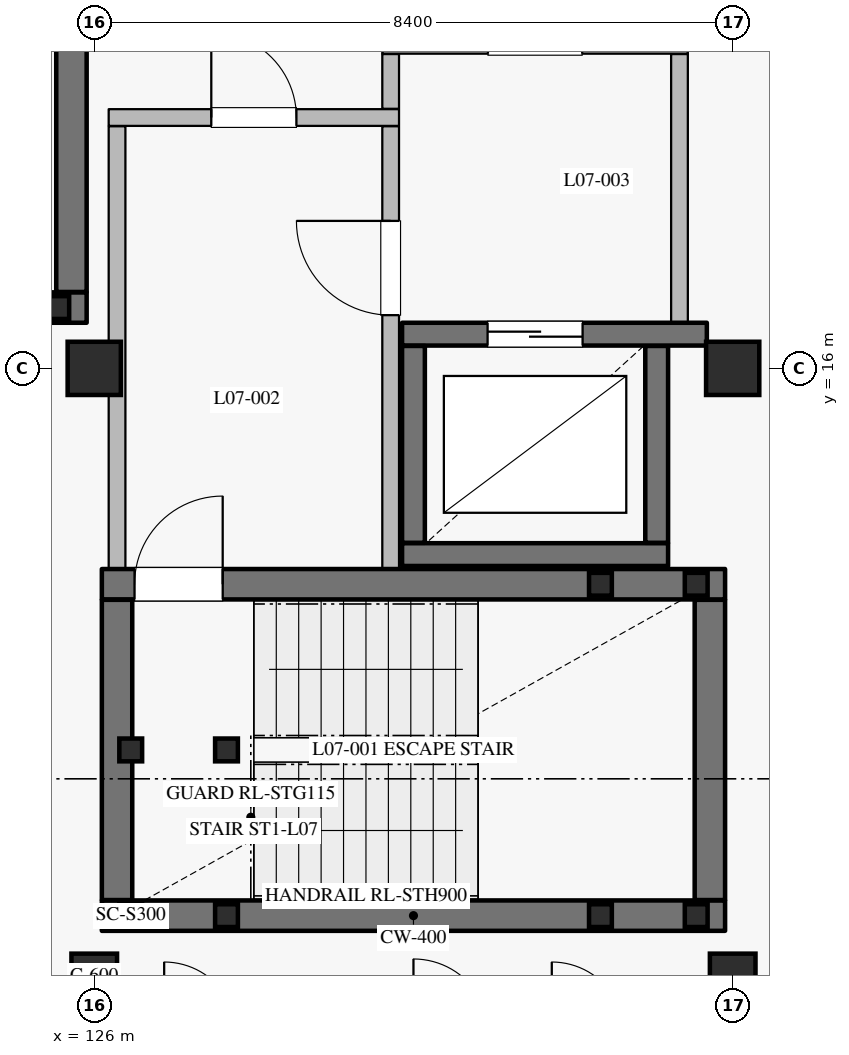
"""IFC4 building model, lengths in metres.
Left out: names, types, materials, properties, quantities, classifications, styles, units other than length and angle.
Written with IfcOpenShell. Run it as: python <this file> out.ifc"""

import sys

from ifc_helpers import new_model, si_unit, direction, frame, frame_2d, origin, origin_2d, place, context, subcontext, project, spatial, rectangle, hollow_rectangle, extrude, element, fill, save


model = new_model("IFC4")
c1 = context("Model", 3, precision=1e-05, world=origin(), true_north=direction((0.0, 1.0)))
c2 = subcontext(c1, "Body", "Model", "MODEL_VIEW")
j1 = project(units=[si_unit("LENGTHUNIT", "METRE"), si_unit("PLANEANGLEUNIT", "RADIAN")], contexts=[c1])
p1 = place(None, origin())
s1 = spatial("IfcSite", under=j1, at=p1, CompositionType="ELEMENT")
p2 = place(p1, origin())
s2 = spatial("IfcBuilding", under=s1, at=p2, CompositionType="ELEMENT")
p3 = place(p2, frame((0.0, 0.0, 32.4)))
s3 = spatial("IfcBuildingStorey", under=s2, at=p3, CompositionType="ELEMENT", Elevation=32.4)
for number, where, z_axis, x_axis in (
    (1, (126.0, 16.0, 0.0), (0.0, 0.0, 1.0), (1.0, 0.0, 0.0)),
    (2, (134.4, 16.0, 0.0), (0.0, 0.0, 1.0), (1.0, 0.0, 0.0)),
):
    element("IfcColumn", number, at=place(p3, frame(where, z_axis=z_axis, x_axis=x_axis)), inside=s3, PredefinedType="COLUMN", context=c2, shape_type="SweptSolid", body=[
        extrude(rectangle(XDim=0.7, YDim=0.7, at=origin_2d()), origin(), (0.0, 0.0, 1.0), 3.6),
    ])
for number, where, z_axis, x_axis in (
    (3, (126.0, 8.0, 0.0), (0.0, 0.0, 1.0), (1.0, 0.0, 0.0)),
    (4, (134.4, 8.0, 0.0), (0.0, 0.0, 1.0), (1.0, 0.0, 0.0)),
):
    element("IfcColumn", number, at=place(p3, frame(where, z_axis=z_axis, x_axis=x_axis)), inside=s3, PredefinedType="COLUMN", context=c2, shape_type="SweptSolid", body=[
        extrude(rectangle(XDim=0.6, YDim=0.6, at=origin_2d()), origin(), (0.0, 0.0, 1.0), 3.6),
    ])
p4 = place(p3, frame((130.05, 13.55, 0.0), z_axis=(0.0, 0.0, 1.0), x_axis=(1.0, 0.0, 0.0)))
e5 = element("IfcWall", 5, at=p4, inside=s3, PredefinedType="SHEAR", context=c2, shape_type="SweptSolid", body=[
    extrude(rectangle(XDim=3.5, YDim=0.3, at=frame_2d((1.75, 0.0))), origin(), (0.0, 0.0, 1.0), 3.335),
])
p5 = place(p3, frame((133.4, 13.705, 0.0), z_axis=(0.0, 0.0, 1.0), x_axis=(0.0, 1.0, 0.0)))
e6 = element("IfcWall", 6, at=p5, inside=s3, PredefinedType="SHEAR", context=c2, shape_type="SweptSolid", body=[
    extrude(rectangle(XDim=2.59, YDim=0.3, at=frame_2d((1.295, 0.0))), origin(), (0.0, 0.0, 1.0), 3.335),
])
p6 = place(p3, frame((134.06, 16.45, 0.0), z_axis=(0.0, 0.0, 1.0), x_axis=(-1.0, 0.0, 0.0)))
e7 = element("IfcWall", 7, at=p6, inside=s3, PredefinedType="SHEAR", context=c2, shape_type="SweptSolid", body=[
    extrude(rectangle(XDim=4.01, YDim=0.3, at=frame_2d((2.005, 0.0))), origin(), (0.0, 0.0, 1.0), 3.335),
])
p7 = place(p6, frame((1.635, 0.0, 0.0)))
e8 = element("IfcOpeningElement", 8, at=p7, cuts=e7, PredefinedType="OPENING", context=c2, shape_type="SweptSolid", body=[
    extrude(rectangle(XDim=1.25, YDim=2.25, at=frame_2d((0.625, 1.125))), frame((0.0, 0.16, 0.0), z_axis=(0.0, -1.0, 0.0), x_axis=(1.0, 0.0, 0.0)), (0.0, 0.0, 1.0), 0.32),
])
p8 = place(p3, frame((130.2, 16.295, 0.0), z_axis=(0.0, 0.0, 1.0), x_axis=(0.0, -1.0, 0.0)))
e9 = element("IfcWall", 9, at=p8, inside=s3, PredefinedType="SHEAR", context=c2, shape_type="SweptSolid", body=[
    extrude(rectangle(XDim=2.59, YDim=0.3, at=frame_2d((1.295, 0.0))), origin(), (0.0, 0.0, 1.0), 3.335),
])
p9 = place(p3, frame((126.1, 8.8, 0.0), z_axis=(0.0, 0.0, 1.0), x_axis=(1.0, 0.0, 0.0)))
e10 = element("IfcWall", 10, at=p9, inside=s3, PredefinedType="SHEAR", context=c2, shape_type="SweptSolid", body=[
    extrude(rectangle(XDim=8.2, YDim=0.4, at=frame_2d((4.1, 0.0))), origin(), (0.0, 0.0, 1.0), 3.335),
])
p10 = place(p3, frame((134.1, 9.005, 0.0), z_axis=(0.0, 0.0, 1.0), x_axis=(0.0, 1.0, 0.0)))
e11 = element("IfcWall", 11, at=p10, inside=s3, PredefinedType="SHEAR", context=c2, shape_type="SweptSolid", body=[
    extrude(rectangle(XDim=3.95, YDim=0.4, at=frame_2d((1.975, 0.0))), origin(), (0.0, 0.0, 1.0), 3.335),
])
p11 = place(p3, frame((126.1, 13.16, 0.0), z_axis=(0.0, 0.0, 1.0), x_axis=(1.0, 0.0, 0.0)))
e12 = element("IfcWall", 12, at=p11, inside=s3, PredefinedType="SHEAR", context=c2, shape_type="SweptSolid", body=[
    extrude(rectangle(XDim=8.2, YDim=0.4, at=frame_2d((4.1, 0.0))), origin(), (0.0, 0.0, 1.0), 3.335),
])
p12 = place(p11, frame((0.43, 0.0, 0.0)))
e13 = element("IfcOpeningElement", 13, at=p12, cuts=e12, PredefinedType="OPENING", context=c2, shape_type="SweptSolid", body=[
    extrude(rectangle(XDim=1.16, YDim=2.2, at=frame_2d((0.58, 1.1))), frame((0.0, 0.21, 0.0), z_axis=(0.0, -1.0, 0.0), x_axis=(1.0, 0.0, 0.0)), (0.0, 0.0, 1.0), 0.42),
])
p13 = place(p3, frame((126.3, 9.005, 0.0), z_axis=(0.0, 0.0, 1.0), x_axis=(0.0, 1.0, 0.0)))
e14 = element("IfcWall", 14, at=p13, inside=s3, PredefinedType="SHEAR", context=c2, shape_type="SweptSolid", body=[
    extrude(rectangle(XDim=3.95, YDim=0.4, at=frame_2d((1.975, 0.0))), origin(), (0.0, 0.0, 1.0), 3.335),
])
p14 = place(p3, frame((126.3, 13.365, 0.0), z_axis=(0.0, 0.0, 1.0), x_axis=(0.0, 1.0, 0.0)))
e15 = element("IfcWall", 15, at=p14, inside=s3, PredefinedType="PARTITIONING", context=c2, shape_type="SweptSolid", body=[
    extrude(rectangle(XDim=5.82, YDim=0.22, at=frame_2d((2.91, 0.0))), origin(), (0.0, 0.0, 1.0), 3.335),
])
p15 = place(p3, frame((126.19, 19.3, 0.0), z_axis=(0.0, 0.0, 1.0), x_axis=(1.0, 0.0, 0.0)))
e16 = element("IfcWall", 16, at=p15, inside=s3, PredefinedType="PARTITIONING", context=c2, shape_type="SweptSolid", body=[
    extrude(rectangle(XDim=3.82, YDim=0.22, at=frame_2d((1.91, 0.0))), origin(), (0.0, 0.0, 1.0), 3.335),
])
p16 = place(p15, frame((1.35, 0.0, 0.0)))
e17 = element("IfcOpeningElement", 17, at=p16, cuts=e16, PredefinedType="OPENING", context=c2, shape_type="SweptSolid", body=[
    extrude(rectangle(XDim=1.12, YDim=2.2, at=frame_2d((0.56, 1.1))), frame((0.0, 0.12, 0.0), z_axis=(0.0, -1.0, 0.0), x_axis=(1.0, 0.0, 0.0)), (0.0, 0.0, 1.0), 0.24),
])
p17 = place(p3, frame((129.9, 13.365, 0.0), z_axis=(0.0, 0.0, 1.0), x_axis=(0.0, 1.0, 0.0)))
e18 = element("IfcWall", 18, at=p17, inside=s3, PredefinedType="PARTITIONING", context=c2, shape_type="SweptSolid", body=[
    extrude(rectangle(XDim=5.82, YDim=0.22, at=frame_2d((2.91, 0.0))), origin(), (0.0, 0.0, 1.0), 3.335),
])
p18 = place(p17, frame((3.335, 0.0, 0.0)))
e19 = element("IfcOpeningElement", 19, at=p18, cuts=e18, PredefinedType="OPENING", context=c2, shape_type="SweptSolid", body=[
    extrude(rectangle(XDim=1.24, YDim=2.2, at=frame_2d((0.62, 1.1))), frame((0.0, 0.12, 0.0), z_axis=(0.0, -1.0, 0.0), x_axis=(1.0, 0.0, 0.0)), (0.0, 0.0, 1.0), 0.24),
])
p19 = place(p3, frame((129.9, 19.415, 0.0), z_axis=(0.0, 0.0, 1.0), x_axis=(0.0, 1.0, 0.0)))
e20 = element("IfcWall", 20, at=p19, inside=s3, PredefinedType="PARTITIONING", context=c2, shape_type="SweptSolid", body=[
    extrude(rectangle(XDim=0.72, YDim=0.22, at=frame_2d((0.36, 0.0))), origin(), (0.0, 0.0, 1.0), 3.335),
])
p20 = place(p3, frame((133.7, 16.605, 0.0), z_axis=(0.0, 0.0, 1.0), x_axis=(0.0, 1.0, 0.0)))
e21 = element("IfcWall", 21, at=p20, inside=s3, PredefinedType="PARTITIONING", context=c2, shape_type="SweptSolid", body=[
    extrude(rectangle(XDim=3.53, YDim=0.22, at=frame_2d((1.765, 0.0))), origin(), (0.0, 0.0, 1.0), 3.335),
])
p21 = place(p3, frame((129.79, 20.25, 0.0), z_axis=(0.0, 0.0, 1.0), x_axis=(1.0, 0.0, 0.0)))
e22 = element("IfcWall", 22, at=p21, inside=s3, PredefinedType="PARTITIONING", context=c2, shape_type="SweptSolid", body=[
    extrude(rectangle(XDim=4.02, YDim=0.22, at=frame_2d((2.01, 0.0))), origin(), (0.0, 0.0, 1.0), 3.335),
])
p22 = place(p21, frame((1.39, 0.0, 0.0)))
e23 = element("IfcOpeningElement", 23, at=p22, cuts=e22, PredefinedType="OPENING", context=c2, shape_type="SweptSolid", body=[
    extrude(rectangle(XDim=1.24, YDim=2.2, at=frame_2d((0.62, 1.1))), frame((0.0, 0.12, 0.0), z_axis=(0.0, -1.0, 0.0), x_axis=(1.0, 0.0, 0.0)), (0.0, 0.0, 1.0), 0.24),
])
for number, where, z_axis, x_axis in (
    (24, (126.48, 8.8, 0.0), (0.0, 0.0, 1.0), (1.0, 0.0, 0.0)),
    (25, (126.48, 10.98, 0.0), (0.0, 0.0, 1.0), (1.0, 0.0, 0.0)),
    (26, (127.74, 8.8, 0.0), (0.0, 0.0, 1.0), (1.0, 0.0, 0.0)),
    (27, (127.74, 10.98, 0.0), (0.0, 0.0, 1.0), (1.0, 0.0, 0.0)),
):
    element("IfcColumn", number, at=place(p3, frame(where, z_axis=z_axis, x_axis=x_axis)), inside=s3, PredefinedType="COLUMN", context=c2, shape_type="SweptSolid", body=[
        extrude(hollow_rectangle(XDim=0.3, YDim=0.3, WallThickness=0.012, at=origin_2d()), origin(), (0.0, 0.0, 1.0), 3.42),
    ])
for number, where, z_axis, x_axis in (
    (28, (132.66, 8.8, -1.8), (0.0, 0.0, 1.0), (1.0, 0.0, 0.0)),
    (29, (132.66, 13.16, -1.8), (0.0, 0.0, 1.0), (1.0, 0.0, 0.0)),
    (30, (133.92, 8.8, -1.8), (0.0, 0.0, 1.0), (1.0, 0.0, 0.0)),
    (31, (133.92, 13.16, -1.8), (0.0, 0.0, 1.0), (1.0, 0.0, 0.0)),
):
    element("IfcColumn", number, at=place(p3, frame(where, z_axis=z_axis, x_axis=x_axis)), inside=s3, PredefinedType="COLUMN", context=c2, shape_type="SweptSolid", body=[
        extrude(hollow_rectangle(XDim=0.3, YDim=0.3, WallThickness=0.012, at=origin_2d()), origin(), (0.0, 0.0, 1.0), 3.42),
    ])
p23 = place(p3, frame((117.75, 16.8, 0.0), z_axis=(0.0, 0.0, 1.0), x_axis=(1.0, 0.0, 0.0)))
e32 = element("IfcWall", 32, at=p23, inside=s3, PredefinedType="SHEAR", context=c2, shape_type="SweptSolid", body=[
    extrude(rectangle(XDim=8.15, YDim=0.4, at=frame_2d((4.075, 0.0))), origin(), (0.0, 0.0, 1.0), 3.335),
])
p24 = place(p3, frame((125.7, 17.005, 0.0), z_axis=(0.0, 0.0, 1.0), x_axis=(0.0, 1.0, 0.0)))
e33 = element("IfcWall", 33, at=p24, inside=s3, PredefinedType="SHEAR", context=c2, shape_type="SweptSolid", body=[
    extrude(rectangle(XDim=3.95, YDim=0.4, at=frame_2d((1.975, 0.0))), origin(), (0.0, 0.0, 1.0), 3.335),
])
p25 = place(p3, frame((125.52, 16.8, -1.8), z_axis=(0.0, 0.0, 1.0), x_axis=(1.0, 0.0, 0.0)))
e34 = element("IfcColumn", 34, at=p25, inside=s3, PredefinedType="COLUMN", context=c2, shape_type="SweptSolid", body=[
    extrude(hollow_rectangle(XDim=0.3, YDim=0.3, WallThickness=0.012, at=origin_2d()), origin(), (0.0, 0.0, 1.0), 3.42),
])
p26 = place(p7, origin())
e35 = element("IfcDoor", 35, at=p26, inside=s3, OperationType="DOUBLE_DOOR_SLIDING", PredefinedType="DOOR", context=c2, shape_type="SweptSolid", body=[
    extrude(rectangle(XDim=1.25, YDim=2.25, at=frame_2d((0.625, 1.125))), frame((0.0, 0.025, 0.0), z_axis=(0.0, -1.0, 0.0), x_axis=(1.0, 0.0, 0.0)), (0.0, 0.0, 1.0), 0.05),
])
fill(e8, e35)
p27 = place(p12, origin())
e36 = element("IfcDoor", 36, at=p27, inside=s3, OperationType="SINGLE_SWING_RIGHT", PredefinedType="DOOR", context=c2, shape_type="SweptSolid", body=[
    extrude(rectangle(XDim=1.16, YDim=2.2, at=frame_2d((0.58, 1.1))), frame((0.0, 0.025, 0.0), z_axis=(0.0, -1.0, 0.0), x_axis=(1.0, 0.0, 0.0)), (0.0, 0.0, 1.0), 0.05),
])
fill(e13, e36)
p28 = place(p16, origin())
e37 = element("IfcDoor", 37, at=p28, inside=s3, OperationType="SINGLE_SWING_LEFT", PredefinedType="DOOR", context=c2, shape_type="SweptSolid", body=[
    extrude(rectangle(XDim=1.12, YDim=2.2, at=frame_2d((0.56, 1.1))), frame((0.0, 0.025, 0.0), z_axis=(0.0, -1.0, 0.0), x_axis=(1.0, 0.0, 0.0)), (0.0, 0.0, 1.0), 0.05),
])
fill(e17, e37)
p29 = place(p18, origin())
e38 = element("IfcDoor", 38, at=p29, inside=s3, OperationType="SINGLE_SWING_RIGHT", PredefinedType="DOOR", context=c2, shape_type="SweptSolid", body=[
    extrude(rectangle(XDim=1.24, YDim=2.2, at=frame_2d((0.62, 1.1))), frame((0.0, 0.025, 0.0), z_axis=(0.0, -1.0, 0.0), x_axis=(1.0, 0.0, 0.0)), (0.0, 0.0, 1.0), 0.05),
])
fill(e19, e38)
save(model, sys.argv[1])
